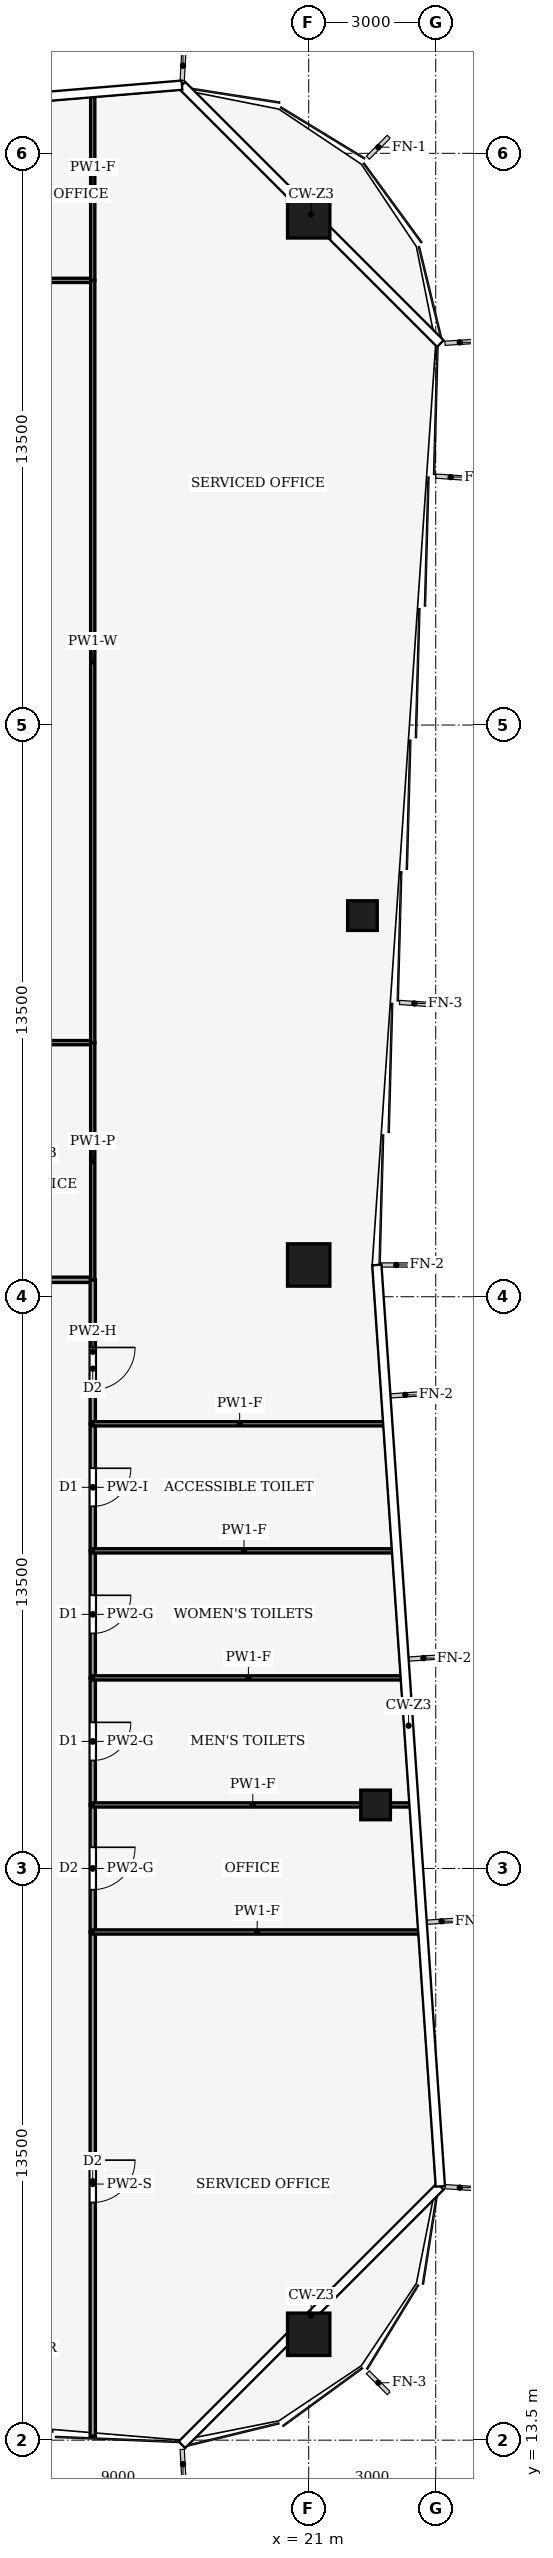
"""IFC4 building model, lengths in metres.
Left out: names, types, materials, properties, quantities, classifications, styles, units other than length and angle.
Written with IfcOpenShell. Run it as: python <this file> out.ifc"""

import sys

from ifc_helpers import new_model, si_unit, direction, frame, frame_2d, origin, origin_2d, place, context, subcontext, project, spatial, rectangle, hollow_rectangle, extrude, element, fill, save


model = new_model("IFC4")
c1 = context("Model", 3, precision=1e-05, world=origin(), true_north=direction((0.0, 1.0)))
c2 = subcontext(c1, "Body", "Model", "MODEL_VIEW")
j1 = project(units=[si_unit("LENGTHUNIT", "METRE"), si_unit("PLANEANGLEUNIT", "RADIAN")], contexts=[c1])
p1 = place(None, origin())
s1 = spatial("IfcSite", under=j1, at=p1, CompositionType="ELEMENT")
p2 = place(p1, origin())
s2 = spatial("IfcBuilding", under=s1, at=p2, CompositionType="ELEMENT")
p3 = place(p2, frame((0.0, 0.0, 206.0)))
s3 = spatial("IfcBuildingStorey", under=s2, at=p3, CompositionType="ELEMENT", Elevation=206.0)
for number, where, z_axis, x_axis in (
    (1, (21.0, 66.0, 0.0), (0.0, 0.0, 1.0), (1.0, 0.0, 0.0)),
    (2, (21.0, 41.25, 0.0), (0.0, 0.0, 1.0), (1.0, 0.0, 0.0)),
    (3, (21.0, 16.0, 0.0), (0.0, 0.0, 1.0), (1.0, 0.0, 0.0)),
):
    element("IfcColumn", number, at=place(p3, frame(where, z_axis=z_axis, x_axis=x_axis)), inside=s3, PredefinedType="COLUMN", context=c2, shape_type="SweptSolid", body=[
        extrude(hollow_rectangle(XDim=1.0, YDim=1.0, WallThickness=0.06, at=origin_2d()), origin(), (0.0, 0.0, 1.0), 4.0),
    ])
for number, where, z_axis, x_axis in (
    (4, (22.579, 28.5, 0.0), (0.0, 0.0, 1.0), (1.0, 0.0, 0.0)),
    (5, (22.269, 49.5, 0.0), (0.0, 0.0, 1.0), (1.0, 0.0, 0.0)),
):
    element("IfcColumn", number, at=place(p3, frame(where, z_axis=z_axis, x_axis=x_axis)), inside=s3, PredefinedType="COLUMN", context=c2, shape_type="SweptSolid", body=[
        extrude(hollow_rectangle(XDim=0.7, YDim=0.7, WallThickness=0.03, at=origin_2d()), origin(), (0.0, 0.0, 1.0), 4.0),
    ])
p4 = place(p3, frame((12.0, 40.9, 0.0), z_axis=(0.0, 0.0, 1.0), x_axis=(1.0, 0.0, 0.0)))
e6 = element("IfcWall", 6, at=p4, inside=s3, PredefinedType="PARTITIONING", context=c2, shape_type="SweptSolid", body=[
    extrude(rectangle(XDim=3.9, YDim=0.125, at=frame_2d((1.95, 0.0))), origin(), (0.0, 0.0, 1.0), 3.44),
])
p5 = place(p4, frame((1.45, 0.0, 0.0)))
e7 = element("IfcOpeningElement", 7, at=p5, cuts=e6, PredefinedType="OPENING", context=c2, shape_type="SweptSolid", body=[
    extrude(rectangle(XDim=1.0, YDim=2.1, at=frame_2d((0.5, 1.05))), frame((0.0, 0.073, 0.0), z_axis=(0.0, -1.0, 0.0), x_axis=(1.0, 0.0, 0.0)), (0.0, 0.0, 1.0), 0.145),
])
p6 = place(p3, frame((15.9, 25.5, 0.0), z_axis=(0.0, 0.0, 1.0), x_axis=(0.0, -1.0, 0.0)))
e8 = element("IfcWall", 8, at=p6, inside=s3, PredefinedType="PARTITIONING", context=c2, shape_type="SweptSolid", body=[
    extrude(rectangle(XDim=11.905, YDim=0.125, at=frame_2d((5.953, 0.0))), origin(), (0.0, 0.0, 1.0), 3.04),
])
p7 = place(p6, frame((5.387, 0.0, 0.0)))
e9 = element("IfcOpeningElement", 9, at=p7, cuts=e8, PredefinedType="OPENING", context=c2, shape_type="SweptSolid", body=[
    extrude(rectangle(XDim=1.0, YDim=2.1, at=frame_2d((0.5, 1.05))), frame((0.0, 0.073, 0.0), z_axis=(0.0, -1.0, 0.0), x_axis=(1.0, 0.0, 0.0)), (0.0, 0.0, 1.0), 0.145),
])
p8 = place(p3, frame((15.9, 28.5, 0.0), z_axis=(0.0, 0.0, 1.0), x_axis=(0.0, -1.0, 0.0)))
e10 = element("IfcWall", 10, at=p8, inside=s3, PredefinedType="PARTITIONING", context=c2, shape_type="SweptSolid", body=[
    extrude(rectangle(XDim=3.0, YDim=0.125, at=frame_2d((1.5, 0.0))), origin(), (0.0, 0.0, 1.0), 3.87),
])
p9 = place(p8, frame((1.0, 0.0, 0.0)))
e11 = element("IfcOpeningElement", 11, at=p9, cuts=e10, PredefinedType="OPENING", context=c2, shape_type="SweptSolid", body=[
    extrude(rectangle(XDim=1.0, YDim=2.1, at=frame_2d((0.5, 1.05))), frame((0.0, 0.073, 0.0), z_axis=(0.0, -1.0, 0.0), x_axis=(1.0, 0.0, 0.0)), (0.0, 0.0, 1.0), 0.145),
])
p10 = place(p3, frame((15.9, 31.5, 0.0), z_axis=(0.0, 0.0, 1.0), x_axis=(0.0, -1.0, 0.0)))
e12 = element("IfcWall", 12, at=p10, inside=s3, PredefinedType="PARTITIONING", context=c2, shape_type="SweptSolid", body=[
    extrude(rectangle(XDim=3.0, YDim=0.125, at=frame_2d((1.5, 0.0))), origin(), (0.0, 0.0, 1.0), 3.87),
])
p11 = place(p10, frame((1.05, 0.0, 0.0)))
e13 = element("IfcOpeningElement", 13, at=p11, cuts=e12, PredefinedType="OPENING", context=c2, shape_type="SweptSolid", body=[
    extrude(rectangle(XDim=0.9, YDim=2.1, at=frame_2d((0.45, 1.05))), frame((0.0, 0.073, 0.0), z_axis=(0.0, -1.0, 0.0), x_axis=(1.0, 0.0, 0.0)), (0.0, 0.0, 1.0), 0.145),
])
p12 = place(p3, frame((15.9, 34.5, 0.0), z_axis=(0.0, 0.0, 1.0), x_axis=(0.0, -1.0, 0.0)))
e14 = element("IfcWall", 14, at=p12, inside=s3, PredefinedType="PARTITIONING", context=c2, shape_type="SweptSolid", body=[
    extrude(rectangle(XDim=3.0, YDim=0.125, at=frame_2d((1.5, 0.0))), origin(), (0.0, 0.0, 1.0), 3.87),
])
p13 = place(p12, frame((1.05, 0.0, 0.0)))
e15 = element("IfcOpeningElement", 15, at=p13, cuts=e14, PredefinedType="OPENING", context=c2, shape_type="SweptSolid", body=[
    extrude(rectangle(XDim=0.9, YDim=2.1, at=frame_2d((0.45, 1.05))), frame((0.0, 0.073, 0.0), z_axis=(0.0, -1.0, 0.0), x_axis=(1.0, 0.0, 0.0)), (0.0, 0.0, 1.0), 0.145),
])
p14 = place(p3, frame((15.9, 37.5, 0.0), z_axis=(0.0, 0.0, 1.0), x_axis=(0.0, -1.0, 0.0)))
e16 = element("IfcWall", 16, at=p14, inside=s3, PredefinedType="PARTITIONING", context=c2, shape_type="SweptSolid", body=[
    extrude(rectangle(XDim=3.0, YDim=0.125, at=frame_2d((1.5, 0.0))), origin(), (0.0, 0.0, 1.0), 3.48),
])
p15 = place(p14, frame((1.05, 0.0, 0.0)))
e17 = element("IfcOpeningElement", 17, at=p15, cuts=e16, PredefinedType="OPENING", context=c2, shape_type="SweptSolid", body=[
    extrude(rectangle(XDim=0.9, YDim=2.1, at=frame_2d((0.45, 1.05))), frame((0.0, 0.073, 0.0), z_axis=(0.0, -1.0, 0.0), x_axis=(1.0, 0.0, 0.0)), (0.0, 0.0, 1.0), 0.145),
])
p16 = place(p3, frame((15.9, 40.904, 0.0), z_axis=(0.0, 0.0, 1.0), x_axis=(0.0, -1.0, 0.0)))
e18 = element("IfcWall", 18, at=p16, inside=s3, PredefinedType="PARTITIONING", context=c2, shape_type="SweptSolid", body=[
    extrude(rectangle(XDim=3.404, YDim=0.125, at=frame_2d((1.702, 0.0))), origin(), (0.0, 0.0, 1.0), 3.14),
])
p17 = place(p16, frame((1.602, 0.0, 0.0)))
e19 = element("IfcOpeningElement", 19, at=p17, cuts=e18, PredefinedType="OPENING", context=c2, shape_type="SweptSolid", body=[
    extrude(rectangle(XDim=1.0, YDim=2.1, at=frame_2d((0.5, 1.05))), frame((0.0, 0.073, 0.0), z_axis=(0.0, -1.0, 0.0), x_axis=(1.0, 0.0, 0.0)), (0.0, 0.0, 1.0), 0.145),
])
p18 = place(p3, frame((15.9, 46.5, 0.0), z_axis=(0.0, 0.0, 1.0), x_axis=(-1.0, 0.0, 0.0)))
e20 = element("IfcWall", 20, at=p18, inside=s3, PredefinedType="PARTITIONING", context=c2, shape_type="SweptSolid", body=[
    extrude(rectangle(XDim=3.904, YDim=0.1, at=frame_2d((1.952, 0.0))), origin(), (0.0, 0.0, 1.0), 3.87),
])
p19 = place(p3, frame((15.9, 40.896, 0.0), z_axis=(0.0, 0.0, 1.0), x_axis=(0.0, 1.0, 0.0)))
e21 = element("IfcWall", 21, at=p19, inside=s3, PredefinedType="PARTITIONING", context=c2, shape_type="SweptSolid", body=[
    extrude(rectangle(XDim=5.608, YDim=0.1, at=frame_2d((2.804, 0.0))), origin(), (0.0, 0.0, 1.0), 3.44),
])
p20 = place(p3, frame((3.0, 64.5, 0.0), z_axis=(0.0, 0.0, 1.0), x_axis=(1.0, 0.0, 0.0)))
e22 = element("IfcWall", 22, at=p20, inside=s3, PredefinedType="PARTITIONING", context=c2, shape_type="SweptSolid", body=[
    extrude(rectangle(XDim=12.9, YDim=0.1, at=frame_2d((6.45, 0.0))), origin(), (0.0, 0.0, 1.0), 3.24),
])
p21 = place(p20, frame((5.95, 0.0, 0.0)))
e23 = element("IfcOpeningElement", 23, at=p21, cuts=e22, PredefinedType="OPENING", context=c2, shape_type="SweptSolid", body=[
    extrude(rectangle(XDim=1.0, YDim=2.1, at=frame_2d((0.5, 1.05))), frame((0.0, 0.06, 0.0), z_axis=(0.0, -1.0, 0.0), x_axis=(1.0, 0.0, 0.0)), (0.0, 0.0, 1.0), 0.12),
])
p22 = place(p3, frame((15.9, 46.496, 0.0), z_axis=(0.0, 0.0, 1.0), x_axis=(0.0, 1.0, 0.0)))
e24 = element("IfcWall", 24, at=p22, inside=s3, PredefinedType="PARTITIONING", context=c2, shape_type="SweptSolid", body=[
    extrude(rectangle(XDim=18.008, YDim=0.1, at=frame_2d((9.004, 0.0))), origin(), (0.0, 0.0, 1.0), 3.24),
])
p23 = place(p3, frame((15.9, 64.496, 0.0), z_axis=(0.0, 0.0, 1.0), x_axis=(0.0, 1.0, 0.0)))
e25 = element("IfcWall", 25, at=p23, inside=s3, PredefinedType="PARTITIONING", context=c2, shape_type="SweptSolid", body=[
    extrude(rectangle(XDim=4.409, YDim=0.1, at=frame_2d((2.205, 0.0))), origin(), (0.0, 0.0, 1.0), 3.04),
])
p24 = place(p3, frame((23.666, 25.5, 0.0), z_axis=(0.0, 0.0, 1.0), x_axis=(-1.0, 0.0, 0.0)))
e26 = element("IfcWall", 26, at=p24, inside=s3, PredefinedType="PARTITIONING", context=c2, shape_type="SweptSolid", body=[
    extrude(rectangle(XDim=7.766, YDim=0.1, at=frame_2d((3.883, 0.0))), origin(), (0.0, 0.0, 1.0), 3.04),
])
p25 = place(p3, frame((23.459, 28.5, 0.0), z_axis=(0.0, 0.0, 1.0), x_axis=(-1.0, 0.0, 0.0)))
e27 = element("IfcWall", 27, at=p25, inside=s3, PredefinedType="PARTITIONING", context=c2, shape_type="SweptSolid", body=[
    extrude(rectangle(XDim=7.559, YDim=0.1, at=frame_2d((3.78, 0.0))), origin(), (0.0, 0.0, 1.0), 3.04),
])
p26 = place(p3, frame((23.252, 31.5, 0.0), z_axis=(0.0, 0.0, 1.0), x_axis=(-1.0, 0.0, 0.0)))
e28 = element("IfcWall", 28, at=p26, inside=s3, PredefinedType="PARTITIONING", context=c2, shape_type="SweptSolid", body=[
    extrude(rectangle(XDim=7.353, YDim=0.1, at=frame_2d((3.676, 0.0))), origin(), (0.0, 0.0, 1.0), 3.04),
])
p27 = place(p3, frame((23.045, 34.5, 0.0), z_axis=(0.0, 0.0, 1.0), x_axis=(-1.0, 0.0, 0.0)))
e29 = element("IfcWall", 29, at=p27, inside=s3, PredefinedType="PARTITIONING", context=c2, shape_type="SweptSolid", body=[
    extrude(rectangle(XDim=7.146, YDim=0.1, at=frame_2d((3.573, 0.0))), origin(), (0.0, 0.0, 1.0), 3.04),
])
p28 = place(p3, frame((22.839, 37.5, 0.0), z_axis=(0.0, 0.0, 1.0), x_axis=(-1.0, 0.0, 0.0)))
e30 = element("IfcWall", 30, at=p28, inside=s3, PredefinedType="PARTITIONING", context=c2, shape_type="SweptSolid", body=[
    extrude(rectangle(XDim=6.939, YDim=0.1, at=frame_2d((3.469, 0.0))), origin(), (0.0, 0.0, 1.0), 3.04),
])
p29 = place(p7, origin())
e31 = element("IfcDoor", 31, at=p29, inside=s3, OperationType="SINGLE_SWING_LEFT", PredefinedType="DOOR", context=c2, shape_type="SweptSolid", body=[
    extrude(rectangle(XDim=1.0, YDim=2.1, at=frame_2d((0.5, 1.05))), frame((0.0, 0.025, 0.0), z_axis=(0.0, -1.0, 0.0), x_axis=(1.0, 0.0, 0.0)), (0.0, 0.0, 1.0), 0.05),
])
fill(e9, e31)
p30 = place(p9, origin())
e32 = element("IfcDoor", 32, at=p30, inside=s3, OperationType="SINGLE_SWING_LEFT", PredefinedType="DOOR", context=c2, shape_type="SweptSolid", body=[
    extrude(rectangle(XDim=1.0, YDim=2.1, at=frame_2d((0.5, 1.05))), frame((0.0, 0.025, 0.0), z_axis=(0.0, -1.0, 0.0), x_axis=(1.0, 0.0, 0.0)), (0.0, 0.0, 1.0), 0.05),
])
fill(e11, e32)
p31 = place(p11, origin())
e33 = element("IfcDoor", 33, at=p31, inside=s3, OperationType="SINGLE_SWING_RIGHT", PredefinedType="DOOR", context=c2, shape_type="SweptSolid", body=[
    extrude(rectangle(XDim=0.9, YDim=2.1, at=frame_2d((0.45, 1.05))), frame((0.0, 0.025, 0.0), z_axis=(0.0, -1.0, 0.0), x_axis=(1.0, 0.0, 0.0)), (0.0, 0.0, 1.0), 0.05),
])
fill(e13, e33)
p32 = place(p13, origin())
e34 = element("IfcDoor", 34, at=p32, inside=s3, OperationType="SINGLE_SWING_LEFT", PredefinedType="DOOR", context=c2, shape_type="SweptSolid", body=[
    extrude(rectangle(XDim=0.9, YDim=2.1, at=frame_2d((0.45, 1.05))), frame((0.0, 0.025, 0.0), z_axis=(0.0, -1.0, 0.0), x_axis=(1.0, 0.0, 0.0)), (0.0, 0.0, 1.0), 0.05),
])
fill(e15, e34)
p33 = place(p15, origin())
e35 = element("IfcDoor", 35, at=p33, inside=s3, OperationType="SINGLE_SWING_RIGHT", PredefinedType="DOOR", context=c2, shape_type="SweptSolid", body=[
    extrude(rectangle(XDim=0.9, YDim=2.1, at=frame_2d((0.45, 1.05))), frame((0.0, 0.025, 0.0), z_axis=(0.0, -1.0, 0.0), x_axis=(1.0, 0.0, 0.0)), (0.0, 0.0, 1.0), 0.05),
])
fill(e17, e35)
p34 = place(p17, origin())
e36 = element("IfcDoor", 36, at=p34, inside=s3, OperationType="SINGLE_SWING_RIGHT", PredefinedType="DOOR", context=c2, shape_type="SweptSolid", body=[
    extrude(rectangle(XDim=1.0, YDim=2.1, at=frame_2d((0.5, 1.05))), frame((0.0, 0.025, 0.0), z_axis=(0.0, -1.0, 0.0), x_axis=(1.0, 0.0, 0.0)), (0.0, 0.0, 1.0), 0.05),
])
fill(e19, e36)
save(model, sys.argv[1])
